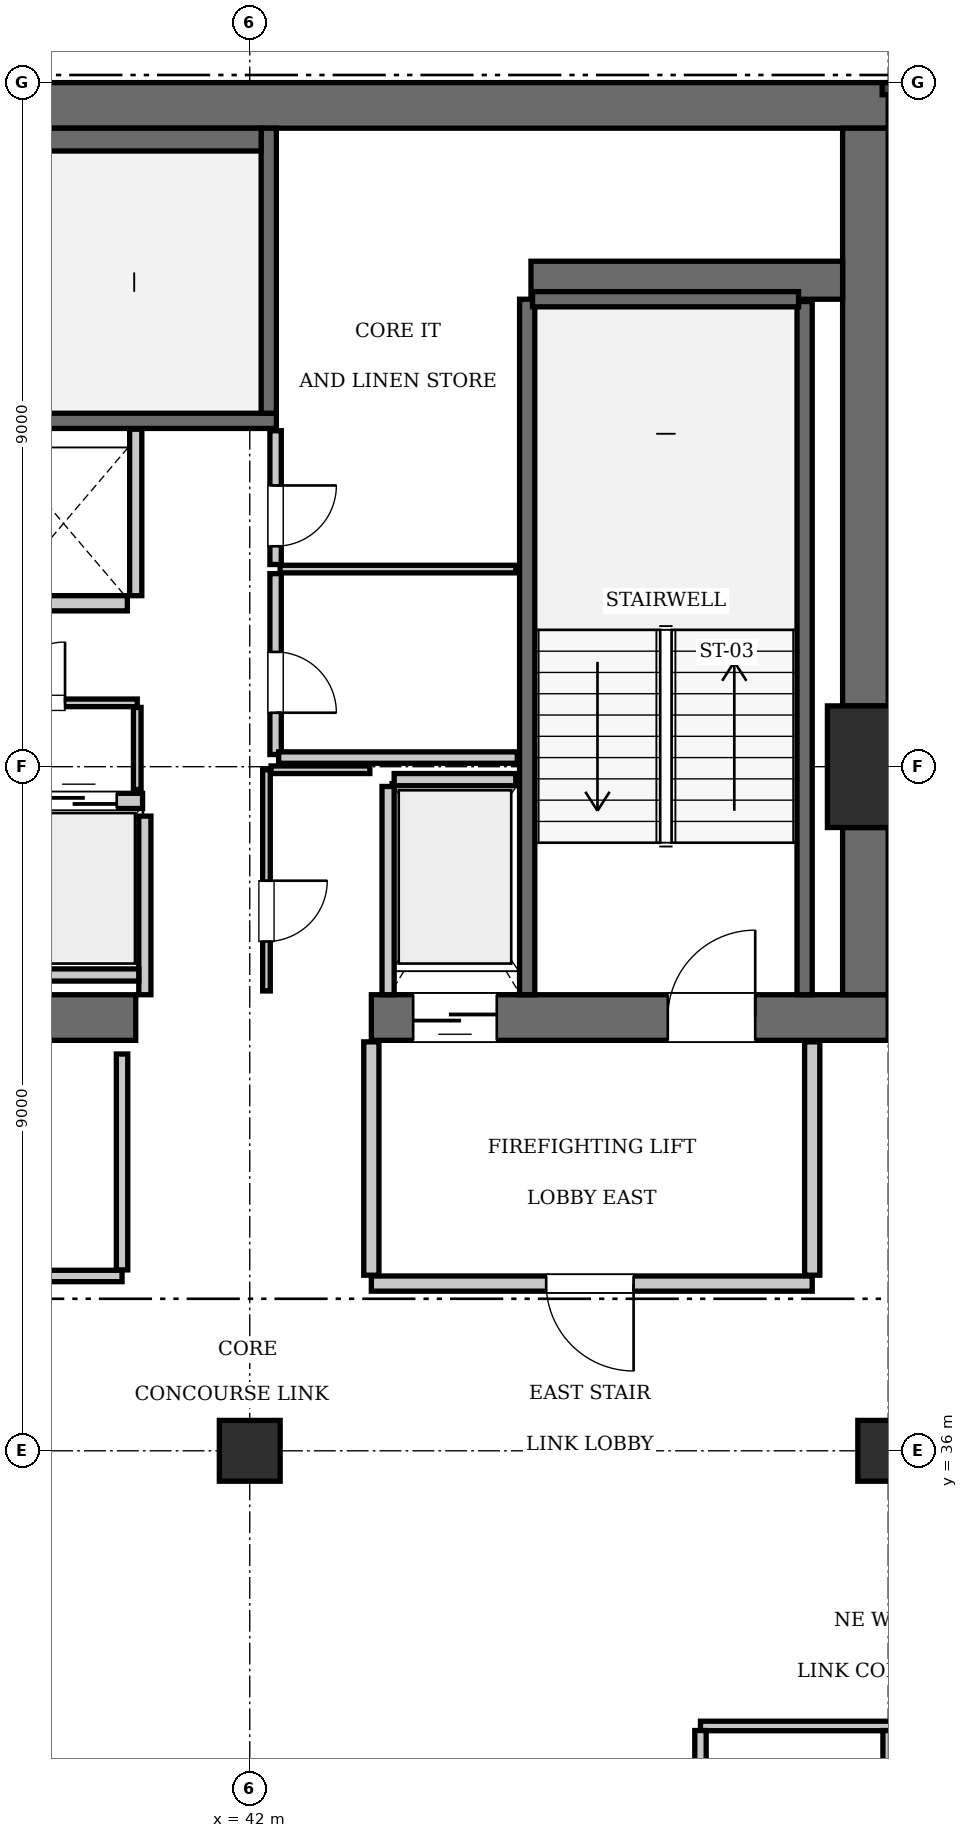
"""IFC4 building model, lengths in metres.
Left out: names, types, materials, properties, quantities, classifications, styles, units other than length and angle.
Written with IfcOpenShell. Run it as: python <this file> out.ifc"""

import sys

from ifc_helpers import new_model, si_unit, direction, frame, frame_2d, origin, origin_2d, place, context, subcontext, project, spatial, rectangle, extrude, element, fill, save


model = new_model("IFC4")
c1 = context("Model", 3, precision=1e-05, world=origin(), true_north=direction((0.0, 1.0)))
c2 = subcontext(c1, "Body", "Model", "MODEL_VIEW")
j1 = project(units=[si_unit("LENGTHUNIT", "METRE"), si_unit("PLANEANGLEUNIT", "RADIAN")], contexts=[c1])
p1 = place(None, origin())
s1 = spatial("IfcSite", under=j1, at=p1, CompositionType="ELEMENT")
p2 = place(p1, origin())
s2 = spatial("IfcBuilding", under=s1, at=p2, CompositionType="ELEMENT")
p3 = place(p2, frame((0.0, 0.0, 243.25)))
s3 = spatial("IfcBuildingStorey", under=s2, at=p3, CompositionType="ELEMENT", Elevation=243.25)
p4 = place(p3, frame((50.4, 45.0, 0.0), z_axis=(0.0, 0.0, 1.0), x_axis=(1.0, 0.0, 0.0)))
e1 = element("IfcColumn", 1, at=p4, inside=s3, PredefinedType="COLUMN", context=c2, shape_type="SweptSolid", body=[
    extrude(rectangle(XDim=1.6, YDim=1.6, at=origin_2d()), origin(), (0.0, 0.0, 1.0), 3.85),
])
p5 = place(p3, frame((25.2, 53.7, 0.0), z_axis=(0.0, 0.0, 1.0), x_axis=(1.0, 0.0, 0.0)))
e2 = element("IfcWall", 2, at=p5, inside=s3, PredefinedType="SHEAR", context=c2, shape_type="SweptSolid", body=[
    extrude(rectangle(XDim=25.2, YDim=0.6, at=frame_2d((12.6, 0.0))), origin(), (0.0, 0.0, 1.0), 3.85),
])
p6 = place(p3, frame((35.1, 41.7, 0.0), z_axis=(0.0, 0.0, 1.0), x_axis=(1.0, 0.0, 0.0)))
e3 = element("IfcWall", 3, at=p6, inside=s3, PredefinedType="SHEAR", context=c2, shape_type="SweptSolid", body=[
    extrude(rectangle(XDim=5.4, YDim=0.6, at=frame_2d((2.7, 0.0))), origin(), (0.0, 0.0, 1.0), 3.85),
])
p7 = place(p3, frame((43.6, 41.7, 0.0), z_axis=(0.0, 0.0, 1.0), x_axis=(1.0, 0.0, 0.0)))
e4 = element("IfcWall", 4, at=p7, inside=s3, PredefinedType="SHEAR", context=c2, shape_type="SweptSolid", body=[
    extrude(rectangle(XDim=6.8, YDim=0.6, at=frame_2d((3.4, 0.0))), origin(), (0.0, 0.0, 1.0), 3.85),
])
p8 = place(p7, frame((3.9, 0.0, 0.0)))
e5 = element("IfcOpeningElement", 5, at=p8, cuts=e4, PredefinedType="OPENING", context=c2, shape_type="SweptSolid", body=[
    extrude(rectangle(XDim=1.15, YDim=2.15, at=frame_2d((0.575, 1.075))), frame((0.0, 0.31, 0.0), z_axis=(0.0, -1.0, 0.0), x_axis=(1.0, 0.0, 0.0)), (0.0, 0.0, 1.0), 0.62),
])
p9 = place(p7, frame((0.55, 0.0, 0.0)))
e6 = element("IfcOpeningElement", 6, at=p9, cuts=e4, PredefinedType="OPENING", context=c2, shape_type="SweptSolid", body=[
    extrude(rectangle(XDim=1.1, YDim=2.2, at=frame_2d((0.55, 1.1))), frame((0.0, 0.31, 0.0), z_axis=(0.0, -1.0, 0.0), x_axis=(1.0, 0.0, 0.0)), (0.0, 0.0, 1.0), 0.62),
])
p10 = place(p3, frame((50.1, 42.0, 0.0), z_axis=(0.0, 0.0, 1.0), x_axis=(0.0, 1.0, 0.0)))
e7 = element("IfcWall", 7, at=p10, inside=s3, PredefinedType="SHEAR", context=c2, shape_type="SweptSolid", body=[
    extrude(rectangle(XDim=2.2, YDim=0.6, at=frame_2d((1.1, 0.0))), origin(), (0.0, 0.0, 1.0), 3.85),
])
p11 = place(p3, frame((50.1, 45.8, 0.0), z_axis=(0.0, 0.0, 1.0), x_axis=(0.0, 1.0, 0.0)))
e8 = element("IfcWall", 8, at=p11, inside=s3, PredefinedType="SHEAR", context=c2, shape_type="SweptSolid", body=[
    extrude(rectangle(XDim=7.6, YDim=0.6, at=frame_2d((3.8, 0.0))), origin(), (0.0, 0.0, 1.0), 3.85),
])
p12 = place(p3, frame((45.7, 51.4, 0.0), z_axis=(0.0, 0.0, 1.0), x_axis=(1.0, 0.0, 0.0)))
e9 = element("IfcWall", 9, at=p12, inside=s3, PredefinedType="SHEAR", context=c2, shape_type="SweptSolid", body=[
    extrude(rectangle(XDim=4.1, YDim=0.5, at=frame_2d((2.05, 0.0))), origin(), (0.0, 0.0, 1.0), 3.85),
])
for number, where, z_axis, x_axis in (
    (10, (42.0, 36.0, 0.0), (0.0, 0.0, 1.0), (1.0, 0.0, 0.0)),
    (11, (50.4, 36.0, 0.0), (0.0, 0.0, 1.0), (1.0, 0.0, 0.0)),
):
    element("IfcColumn", number, at=place(p3, frame(where, z_axis=z_axis, x_axis=x_axis)), inside=s3, PredefinedType="COLUMN", context=c2, shape_type="SweptSolid", body=[
        extrude(rectangle(XDim=0.8, YDim=0.8, at=origin_2d()), origin(), (0.0, 0.0, 1.0), 3.85),
    ])
p13 = place(p3, frame((33.25, 49.55, 0.0), z_axis=(0.0, 0.0, 1.0), x_axis=(1.0, 0.0, 0.0)))
e12 = element("IfcWall", 12, at=p13, inside=s3, PredefinedType="SOLIDWALL", context=c2, shape_type="SweptSolid", body=[
    extrude(rectangle(XDim=9.1, YDim=0.2, at=frame_2d((4.55, 0.0))), origin(), (0.0, 0.0, 1.0), 3.61),
])
p14 = place(p3, frame((42.25, 49.65, 0.0), z_axis=(0.0, 0.0, 1.0), x_axis=(0.0, 1.0, 0.0)))
e13 = element("IfcWall", 13, at=p14, inside=s3, PredefinedType="SOLIDWALL", context=c2, shape_type="SweptSolid", body=[
    extrude(rectangle(XDim=3.75, YDim=0.2, at=frame_2d((1.875, 0.0))), origin(), (0.0, 0.0, 1.0), 3.61),
])
p15 = place(p3, frame((33.45, 53.25, 0.0), z_axis=(0.0, 0.0, 1.0), x_axis=(1.0, 0.0, 0.0)))
e14 = element("IfcWall", 14, at=p15, inside=s3, PredefinedType="SOLIDWALL", context=c2, shape_type="SweptSolid", body=[
    extrude(rectangle(XDim=8.7, YDim=0.3, at=frame_2d((4.35, 0.0))), origin(), (0.0, 0.0, 1.0), 3.61),
])
p16 = place(p3, frame((45.65, 42.0, 0.0), z_axis=(0.0, 0.0, 1.0), x_axis=(0.0, 1.0, 0.0)))
e15 = element("IfcWall", 15, at=p16, inside=s3, PredefinedType="SOLIDWALL", context=c2, shape_type="SweptSolid", body=[
    extrude(rectangle(XDim=9.15, YDim=0.2, at=frame_2d((4.575, 0.0))), origin(), (0.0, 0.0, 1.0), 3.61),
])
p17 = place(p3, frame((49.3, 42.0, 0.0), z_axis=(0.0, 0.0, 1.0), x_axis=(0.0, 1.0, 0.0)))
e16 = element("IfcWall", 16, at=p17, inside=s3, PredefinedType="SOLIDWALL", context=c2, shape_type="SweptSolid", body=[
    extrude(rectangle(XDim=9.12, YDim=0.2, at=frame_2d((4.56, 0.0))), origin(), (0.0, 0.0, 1.0), 3.61),
])
p18 = place(p3, frame((45.72, 51.15, 0.0), z_axis=(0.0, 0.0, 1.0), x_axis=(1.0, 0.0, 0.0)))
e17 = element("IfcWall", 17, at=p18, inside=s3, PredefinedType="SOLIDWALL", context=c2, shape_type="SweptSolid", body=[
    extrude(rectangle(XDim=3.5, YDim=0.2, at=frame_2d((1.75, 0.0))), origin(), (0.0, 0.0, 1.0), 3.61),
])
p19 = place(p3, frame((38.91, 44.55, 0.0), z_axis=(0.0, 0.0, 1.0), x_axis=(1.0, 0.0, 0.0)))
e18 = element("IfcWall", 18, at=p19, inside=s3, PredefinedType="SOLIDWALL", context=c2, shape_type="SweptSolid", body=[
    extrude(rectangle(XDim=1.68, YDim=0.2, at=frame_2d((0.84, 0.0))), origin(), (0.0, 0.0, 1.0), 3.61),
])
p20 = place(p19, frame((0.34, 0.0, 0.0)))
e19 = element("IfcOpeningElement", 19, at=p20, cuts=e18, PredefinedType="OPENING", context=c2, shape_type="SweptSolid", body=[
    extrude(rectangle(XDim=1.0, YDim=2.15, at=frame_2d((0.5, 1.075))), frame((0.0, 0.11, 0.0), z_axis=(0.0, -1.0, 0.0), x_axis=(1.0, 0.0, 0.0)), (0.0, 0.0, 1.0), 0.22),
])
p21 = place(p3, frame((38.71, 47.15, 0.0), z_axis=(0.0, 0.0, 1.0), x_axis=(1.0, 0.0, 0.0)))
e20 = element("IfcWall", 20, at=p21, inside=s3, PredefinedType="SOLIDWALL", context=c2, shape_type="SweptSolid", body=[
    extrude(rectangle(XDim=1.68, YDim=0.2, at=frame_2d((0.84, 0.0))), origin(), (0.0, 0.0, 1.0), 3.61),
])
p22 = place(p3, frame((43.9, 44.83, 0.0), z_axis=(0.0, 0.0, 1.0), x_axis=(1.0, 0.0, 0.0)))
e21 = element("IfcWall", 21, at=p22, inside=s3, PredefinedType="SOLIDWALL", context=c2, shape_type="SweptSolid", body=[
    extrude(rectangle(XDim=1.6, YDim=0.16, at=frame_2d((0.8, 0.0))), origin(), (0.0, 0.0, 1.0), 3.61),
])
p23 = place(p3, frame((43.82, 42.0, 0.0), z_axis=(0.0, 0.0, 1.0), x_axis=(0.0, 1.0, 0.0)))
e22 = element("IfcWall", 22, at=p23, inside=s3, PredefinedType="SOLIDWALL", context=c2, shape_type="SweptSolid", body=[
    extrude(rectangle(XDim=2.74, YDim=0.16, at=frame_2d((1.37, 0.0))), origin(), (0.0, 0.0, 1.0), 3.61),
])
p24 = place(p3, frame((40.62, 42.0, 0.0), z_axis=(0.0, 0.0, 1.0), x_axis=(0.0, 1.0, 0.0)))
e23 = element("IfcWall", 23, at=p24, inside=s3, PredefinedType="SOLIDWALL", context=c2, shape_type="SweptSolid", body=[
    extrude(rectangle(XDim=2.35, YDim=0.16, at=frame_2d((1.175, 0.0))), origin(), (0.0, 0.0, 1.0), 3.61),
])
p25 = place(p3, frame((35.52, 42.26, 0.0), z_axis=(0.0, 0.0, 1.0), x_axis=(1.0, 0.0, 0.0)))
e24 = element("IfcWall", 24, at=p25, inside=s3, PredefinedType="SOLIDWALL", context=c2, shape_type="SweptSolid", body=[
    extrude(rectangle(XDim=5.02, YDim=0.16, at=frame_2d((2.51, 0.0))), origin(), (0.0, 0.0, 1.0), 3.61),
])
p26 = place(p3, frame((40.5, 47.25, 0.0), z_axis=(0.0, 0.0, 1.0), x_axis=(0.0, 1.0, 0.0)))
e25 = element("IfcWall", 25, at=p26, inside=s3, PredefinedType="SOLIDWALL", context=c2, shape_type="SweptSolid", body=[
    extrude(rectangle(XDim=2.19, YDim=0.16, at=frame_2d((1.095, 0.0))), origin(), (0.0, 0.0, 1.0), 3.61),
])
p27 = place(p3, frame((43.6, 38.2, 0.0), z_axis=(0.0, 0.0, 1.0), x_axis=(1.0, 0.0, 0.0)))
e26 = element("IfcWall", 26, at=p27, inside=s3, PredefinedType="PARTITIONING", context=c2, shape_type="SweptSolid", body=[
    extrude(rectangle(XDim=5.8, YDim=0.2, at=frame_2d((2.9, 0.0))), origin(), (0.0, 0.0, 1.0), 3.61),
])
p28 = place(p27, frame((2.3, 0.0, 0.0)))
e27 = element("IfcOpeningElement", 27, at=p28, cuts=e26, PredefinedType="OPENING", context=c2, shape_type="SweptSolid", body=[
    extrude(rectangle(XDim=1.15, YDim=2.15, at=frame_2d((0.575, 1.075))), frame((0.0, 0.11, 0.0), z_axis=(0.0, -1.0, 0.0), x_axis=(1.0, 0.0, 0.0)), (0.0, 0.0, 1.0), 0.22),
])
for number, where, z_axis, x_axis in (
    (28, (43.6, 38.31, 0.0), (0.0, 0.0, 1.0), (0.0, 1.0, 0.0)),
    (29, (49.4, 38.31, 0.0), (0.0, 0.0, 1.0), (0.0, 1.0, 0.0)),
):
    element("IfcWall", number, at=place(p3, frame(where, z_axis=z_axis, x_axis=x_axis)), inside=s3, PredefinedType="PARTITIONING", context=c2, shape_type="SweptSolid", body=[
        extrude(rectangle(XDim=3.07, YDim=0.2, at=frame_2d((1.535, 0.0))), origin(), (0.0, 0.0, 1.0), 3.61),
    ])
p29 = place(p3, frame((38.02, 45.84, 0.0), z_axis=(0.0, 0.0, 1.0), x_axis=(1.0, 0.0, 0.0)))
e30 = element("IfcWall", 30, at=p29, inside=s3, PredefinedType="PARTITIONING", context=c2, shape_type="SweptSolid", body=[
    extrude(rectangle(XDim=2.5, YDim=0.1, at=frame_2d((1.25, 0.0))), origin(), (0.0, 0.0, 1.0), 3.61),
])
p30 = place(p29, frame((0.75, 0.0, 0.0)))
e31 = element("IfcOpeningElement", 31, at=p30, cuts=e30, PredefinedType="OPENING", context=c2, shape_type="SweptSolid", body=[
    extrude(rectangle(XDim=0.8, YDim=2.05, at=frame_2d((0.4, 1.025))), frame((0.0, 0.06, 0.0), z_axis=(0.0, -1.0, 0.0), x_axis=(1.0, 0.0, 0.0)), (0.0, 0.0, 1.0), 0.12),
])
p31 = place(p3, frame((40.52, 44.7, 0.0), z_axis=(0.0, 0.0, 1.0), x_axis=(0.0, 1.0, 0.0)))
e32 = element("IfcWall", 32, at=p31, inside=s3, PredefinedType="PARTITIONING", context=c2, shape_type="SweptSolid", body=[
    extrude(rectangle(XDim=1.08, YDim=0.1, at=frame_2d((0.54, 0.0))), origin(), (0.0, 0.0, 1.0), 3.61),
])
p32 = place(p3, frame((42.22, 42.05, 0.0), z_axis=(0.0, 0.0, 1.0), x_axis=(0.0, 1.0, 0.0)))
e33 = element("IfcWall", 33, at=p32, inside=s3, PredefinedType="PARTITIONING", context=c2, shape_type="SweptSolid", body=[
    extrude(rectangle(XDim=2.91, YDim=0.1, at=frame_2d((1.455, 0.0))), origin(), (0.0, 0.0, 1.0), 3.61),
])
p33 = place(p32, frame((0.65, 0.0, 0.0)))
e34 = element("IfcOpeningElement", 34, at=p33, cuts=e33, PredefinedType="OPENING", context=c2, shape_type="SweptSolid", body=[
    extrude(rectangle(XDim=0.8, YDim=2.05, at=frame_2d((0.4, 1.025))), frame((0.0, 0.06, 0.0), z_axis=(0.0, -1.0, 0.0), x_axis=(1.0, 0.0, 0.0)), (0.0, 0.0, 1.0), 0.12),
])
p34 = place(p3, frame((42.28, 44.96, 0.0), z_axis=(0.0, 0.0, 1.0), x_axis=(1.0, 0.0, 0.0)))
e35 = element("IfcWall", 35, at=p34, inside=s3, PredefinedType="PARTITIONING", context=c2, shape_type="SweptSolid", body=[
    extrude(rectangle(XDim=1.3, YDim=0.1, at=frame_2d((0.65, 0.0))), origin(), (0.0, 0.0, 1.0), 3.61),
])
p35 = place(p3, frame((42.34, 45.16, 0.0), z_axis=(0.0, 0.0, 1.0), x_axis=(0.0, 1.0, 0.0)))
e36 = element("IfcWall", 36, at=p35, inside=s3, PredefinedType="PARTITIONING", context=c2, shape_type="SweptSolid", body=[
    extrude(rectangle(XDim=2.38, YDim=0.15, at=frame_2d((1.19, 0.0))), origin(), (0.0, 0.0, 1.0), 3.61),
])
p36 = place(p35, frame((0.55, 0.0, 0.0)))
e37 = element("IfcOpeningElement", 37, at=p36, cuts=e36, PredefinedType="OPENING", context=c2, shape_type="SweptSolid", body=[
    extrude(rectangle(XDim=0.8, YDim=2.05, at=frame_2d((0.4, 1.025))), frame((0.0, 0.085, 0.0), z_axis=(0.0, -1.0, 0.0), x_axis=(1.0, 0.0, 0.0)), (0.0, 0.0, 1.0), 0.17),
])
p37 = place(p3, frame((42.34, 47.66, 0.0), z_axis=(0.0, 0.0, 1.0), x_axis=(0.0, 1.0, 0.0)))
e38 = element("IfcWall", 38, at=p37, inside=s3, PredefinedType="PARTITIONING", context=c2, shape_type="SweptSolid", body=[
    extrude(rectangle(XDim=1.76, YDim=0.15, at=frame_2d((0.88, 0.0))), origin(), (0.0, 0.0, 1.0), 3.61),
])
p38 = place(p37, frame((0.24, 0.0, 0.0)))
e39 = element("IfcOpeningElement", 39, at=p38, cuts=e38, PredefinedType="OPENING", context=c2, shape_type="SweptSolid", body=[
    extrude(rectangle(XDim=0.8, YDim=2.05, at=frame_2d((0.4, 1.025))), frame((0.0, 0.085, 0.0), z_axis=(0.0, -1.0, 0.0), x_axis=(1.0, 0.0, 0.0)), (0.0, 0.0, 1.0), 0.17),
])
p39 = place(p3, frame((42.4, 47.6, 0.0), z_axis=(0.0, 0.0, 1.0), x_axis=(1.0, 0.0, 0.0)))
e40 = element("IfcWall", 40, at=p39, inside=s3, PredefinedType="PARTITIONING", context=c2, shape_type="SweptSolid", body=[
    extrude(rectangle(XDim=3.1, YDim=0.1, at=frame_2d((1.55, 0.0))), origin(), (0.0, 0.0, 1.0), 3.61),
])
p40 = place(p3, frame((42.38, 45.12, 0.0), z_axis=(0.0, 0.0, 1.0), x_axis=(1.0, 0.0, 0.0)))
e41 = element("IfcWall", 41, at=p40, inside=s3, PredefinedType="PARTITIONING", context=c2, shape_type="SweptSolid", body=[
    extrude(rectangle(XDim=3.14, YDim=0.15, at=frame_2d((1.57, 0.0))), origin(), (0.0, 0.0, 1.0), 3.61),
])
p41 = place(p3, frame((37.38, 38.3, 0.0), z_axis=(0.0, 0.0, 1.0), x_axis=(1.0, 0.0, 0.0)))
e42 = element("IfcWall", 42, at=p41, inside=s3, PredefinedType="PARTITIONING", context=c2, shape_type="SweptSolid", body=[
    extrude(rectangle(XDim=2.94, YDim=0.15, at=frame_2d((1.47, 0.0))), origin(), (0.0, 0.0, 1.0), 3.61),
])
p42 = place(p41, frame((1.0, 0.0, 0.0)))
e43 = element("IfcOpeningElement", 43, at=p42, cuts=e42, PredefinedType="OPENING", context=c2, shape_type="SweptSolid", body=[
    extrude(rectangle(XDim=0.8, YDim=2.05, at=frame_2d((0.4, 1.025))), frame((0.0, 0.085, 0.0), z_axis=(0.0, -1.0, 0.0), x_axis=(1.0, 0.0, 0.0)), (0.0, 0.0, 1.0), 0.17),
])
p43 = place(p3, frame((40.32, 38.38, 0.0), z_axis=(0.0, 0.0, 1.0), x_axis=(0.0, 1.0, 0.0)))
e44 = element("IfcWall", 44, at=p43, inside=s3, PredefinedType="PARTITIONING", context=c2, shape_type="SweptSolid", body=[
    extrude(rectangle(XDim=2.84, YDim=0.15, at=frame_2d((1.42, 0.0))), origin(), (0.0, 0.0, 1.0), 3.61),
])
p44 = place(p3, frame((47.93, 32.38, 0.0), z_axis=(0.0, 0.0, 1.0), x_axis=(1.0, 0.0, 0.0)))
e45 = element("IfcWall", 45, at=p44, inside=s3, PredefinedType="PARTITIONING", context=c2, shape_type="SweptSolid", body=[
    extrude(rectangle(XDim=12.17, YDim=0.125, at=frame_2d((6.085, 0.0))), origin(), (0.0, 0.0, 1.0), 3.61),
])
p45 = place(p3, frame((47.93, 30.35, 0.0), z_axis=(0.0, 0.0, 1.0), x_axis=(0.0, 1.0, 0.0)))
e46 = element("IfcWall", 46, at=p45, inside=s3, PredefinedType="PARTITIONING", context=c2, shape_type="SweptSolid", body=[
    extrude(rectangle(XDim=1.97, YDim=0.15, at=frame_2d((0.985, 0.0))), origin(), (0.0, 0.0, 1.0), 3.61),
])
p46 = place(p3, frame((50.38, 30.35, 0.0), z_axis=(0.0, 0.0, 1.0), x_axis=(0.0, 1.0, 0.0)))
e47 = element("IfcWall", 47, at=p46, inside=s3, PredefinedType="PARTITIONING", context=c2, shape_type="SweptSolid", body=[
    extrude(rectangle(XDim=1.97, YDim=0.1, at=frame_2d((0.985, 0.0))), origin(), (0.0, 0.0, 1.0), 3.077),
])
p47 = place(p8, origin())
e48 = element("IfcDoor", 48, at=p47, inside=s3, OperationType="SINGLE_SWING_RIGHT", PredefinedType="DOOR", context=c2, shape_type="SweptSolid", body=[
    extrude(rectangle(XDim=1.15, YDim=2.15, at=frame_2d((0.575, 1.075))), frame((0.0, 0.025, 0.0), z_axis=(0.0, -1.0, 0.0), x_axis=(1.0, 0.0, 0.0)), (0.0, 0.0, 1.0), 0.05),
])
fill(e5, e48)
p48 = place(p20, origin())
e49 = element("IfcDoor", 49, at=p48, inside=s3, OperationType="SLIDING_TO_LEFT", PredefinedType="DOOR", context=c2, shape_type="SweptSolid", body=[
    extrude(rectangle(XDim=1.0, YDim=2.15, at=frame_2d((0.5, 1.075))), frame((0.0, 0.025, 0.0), z_axis=(0.0, -1.0, 0.0), x_axis=(1.0, 0.0, 0.0)), (0.0, 0.0, 1.0), 0.05),
])
fill(e19, e49)
p49 = place(p9, frame((1.1, 0.0, 0.0), z_axis=(0.0, 0.0, 1.0), x_axis=(-1.0, 0.0, 0.0)))
e50 = element("IfcDoor", 50, at=p49, inside=s3, OperationType="SLIDING_TO_LEFT", PredefinedType="DOOR", context=c2, shape_type="SweptSolid", body=[
    extrude(rectangle(XDim=1.1, YDim=2.2, at=frame_2d((0.55, 1.1))), frame((0.0, 0.025, 0.0), z_axis=(0.0, -1.0, 0.0), x_axis=(1.0, 0.0, 0.0)), (0.0, 0.0, 1.0), 0.05),
])
fill(e6, e50)
p50 = place(p28, frame((1.15, 0.0, 0.0), z_axis=(0.0, 0.0, 1.0), x_axis=(-1.0, 0.0, 0.0)))
e51 = element("IfcDoor", 51, at=p50, inside=s3, OperationType="SINGLE_SWING_LEFT", PredefinedType="DOOR", context=c2, shape_type="SweptSolid", body=[
    extrude(rectangle(XDim=1.15, YDim=2.15, at=frame_2d((0.575, 1.075))), frame((0.0, 0.025, 0.0), z_axis=(0.0, -1.0, 0.0), x_axis=(1.0, 0.0, 0.0)), (0.0, 0.0, 1.0), 0.05),
])
fill(e27, e51)
p51 = place(p30, origin())
e52 = element("IfcDoor", 52, at=p51, inside=s3, OperationType="SINGLE_SWING_RIGHT", PredefinedType="DOOR", context=c2, shape_type="SweptSolid", body=[
    extrude(rectangle(XDim=0.8, YDim=2.05, at=frame_2d((0.4, 1.025))), frame((0.0, 0.025, 0.0), z_axis=(0.0, -1.0, 0.0), x_axis=(1.0, 0.0, 0.0)), (0.0, 0.0, 1.0), 0.05),
])
fill(e31, e52)
p52 = place(p33, frame((0.8, 0.0, 0.0), z_axis=(0.0, 0.0, 1.0), x_axis=(-1.0, 0.0, 0.0)))
e53 = element("IfcDoor", 53, at=p52, inside=s3, OperationType="SINGLE_SWING_LEFT", PredefinedType="DOOR", context=c2, shape_type="SweptSolid", body=[
    extrude(rectangle(XDim=0.8, YDim=2.05, at=frame_2d((0.4, 1.025))), frame((0.0, 0.025, 0.0), z_axis=(0.0, -1.0, 0.0), x_axis=(1.0, 0.0, 0.0)), (0.0, 0.0, 1.0), 0.05),
])
fill(e34, e53)
p53 = place(p36, frame((0.8, 0.0, 0.0), z_axis=(0.0, 0.0, 1.0), x_axis=(-1.0, 0.0, 0.0)))
e54 = element("IfcDoor", 54, at=p53, inside=s3, OperationType="SINGLE_SWING_RIGHT", PredefinedType="DOOR", context=c2, shape_type="SweptSolid", body=[
    extrude(rectangle(XDim=0.8, YDim=2.05, at=frame_2d((0.4, 1.025))), frame((0.0, 0.025, 0.0), z_axis=(0.0, -1.0, 0.0), x_axis=(1.0, 0.0, 0.0)), (0.0, 0.0, 1.0), 0.05),
])
fill(e37, e54)
p54 = place(p38, frame((0.8, 0.0, 0.0), z_axis=(0.0, 0.0, 1.0), x_axis=(-1.0, 0.0, 0.0)))
e55 = element("IfcDoor", 55, at=p54, inside=s3, OperationType="SINGLE_SWING_LEFT", PredefinedType="DOOR", context=c2, shape_type="SweptSolid", body=[
    extrude(rectangle(XDim=0.8, YDim=2.05, at=frame_2d((0.4, 1.025))), frame((0.0, 0.025, 0.0), z_axis=(0.0, -1.0, 0.0), x_axis=(1.0, 0.0, 0.0)), (0.0, 0.0, 1.0), 0.05),
])
fill(e39, e55)
save(model, sys.argv[1])
